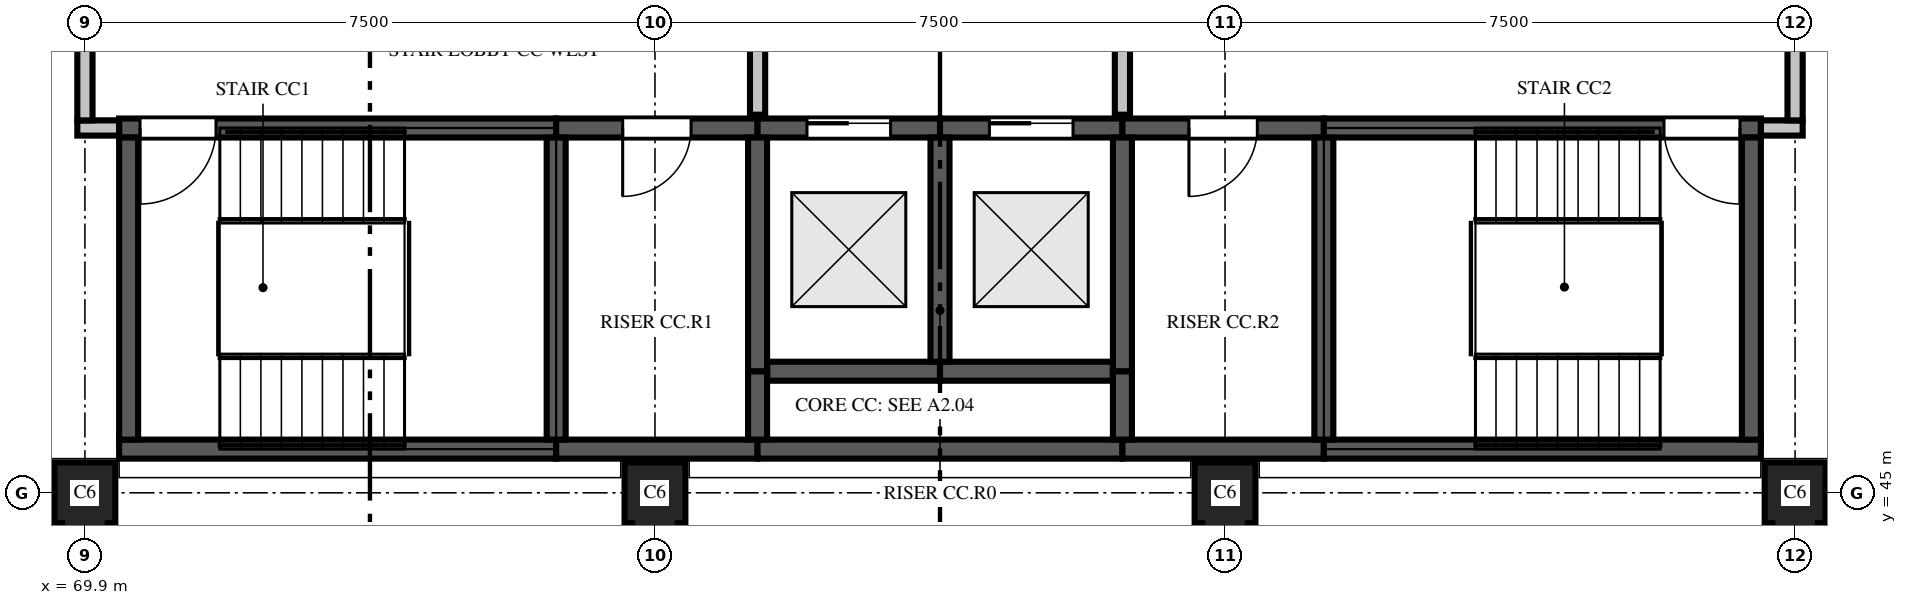
"""IFC4 building model, lengths in metres.
Left out: names, types, materials, properties, quantities, classifications, styles, units other than length and angle.
Written with IfcOpenShell. Run it as: python <this file> out.ifc"""

import sys

from ifc_helpers import new_model, si_unit, direction, frame, frame_2d, origin, place, context, subcontext, project, spatial, polyline, rectangle, outline, extrude, element, fill, save


model = new_model("IFC4")
c1 = context("Model", 3, precision=1e-05, world=origin(), true_north=direction((0.0, 1.0)))
c2 = subcontext(c1, "Body", "Model", "MODEL_VIEW")
j1 = project(units=[si_unit("LENGTHUNIT", "METRE"), si_unit("PLANEANGLEUNIT", "RADIAN")], contexts=[c1])
p1 = place(None, origin())
s1 = spatial("IfcSite", under=j1, at=p1, CompositionType="ELEMENT")
p2 = place(p1, origin())
s2 = spatial("IfcBuilding", under=s1, at=p2, CompositionType="ELEMENT")
p3 = place(p2, frame((0.0, 0.0, 11.9)))
s3 = spatial("IfcBuildingStorey", under=s2, at=p3, CompositionType="ELEMENT", Elevation=11.9)
for number, where, z_axis, x_axis in (
    (1, (69.9, 45.0, 0.0), (0.0, 0.0, 1.0), (0.0, -1.0, 0.0)),
    (2, (77.4, 45.0, 0.0), (0.0, 0.0, 1.0), (0.0, -1.0, 0.0)),
    (3, (84.9, 45.0, 0.0), (0.0, 0.0, 1.0), (0.0, -1.0, 0.0)),
    (4, (92.4, 45.0, 0.0), (0.0, 0.0, 1.0), (0.0, -1.0, 0.0)),
):
    element("IfcColumn", number, at=place(p3, frame(where, z_axis=z_axis, x_axis=x_axis)), inside=s3, PredefinedType="COLUMN", context=c2, shape_type="SweptSolid", body=[
        extrude(outline(polyline([(-0.4, -0.4), (0.4, -0.4), (0.4, -0.3), (0.75, -0.3), (0.75, 0.3), (0.4, 0.3), (0.4, 0.4), (-0.4, 0.4), (-0.4, -0.4)])), origin(), (0.0, 0.0, 1.0), 3.7),
    ])
p4 = place(p3, frame((70.35, 45.575, 0.0), z_axis=(0.0, 0.0, 1.0), x_axis=(1.0, 0.0, 0.0)))
e5 = element("IfcWall", 5, at=p4, inside=s3, PredefinedType="SHEAR", context=c2, shape_type="SweptSolid", body=[
    extrude(rectangle(XDim=5.75, YDim=0.25, at=frame_2d((2.875, 0.0))), origin(), (0.0, 0.0, 1.0), 3.7),
])
p5 = place(p3, frame((76.1, 45.575, 0.0), z_axis=(0.0, 0.0, 1.0), x_axis=(1.0, 0.0, 0.0)))
e6 = element("IfcWall", 6, at=p5, inside=s3, PredefinedType="SHEAR", context=c2, shape_type="SweptSolid", body=[
    extrude(rectangle(XDim=2.65, YDim=0.25, at=frame_2d((1.325, 0.0))), origin(), (0.0, 0.0, 1.0), 3.7),
])
p6 = place(p3, frame((78.75, 45.575, 0.0), z_axis=(0.0, 0.0, 1.0), x_axis=(1.0, 0.0, 0.0)))
e7 = element("IfcWall", 7, at=p6, inside=s3, PredefinedType="SHEAR", context=c2, shape_type="SweptSolid", body=[
    extrude(rectangle(XDim=4.8, YDim=0.25, at=frame_2d((2.4, 0.0))), origin(), (0.0, 0.0, 1.0), 3.7),
])
p7 = place(p3, frame((83.55, 45.575, 0.0), z_axis=(0.0, 0.0, 1.0), x_axis=(1.0, 0.0, 0.0)))
e8 = element("IfcWall", 8, at=p7, inside=s3, PredefinedType="SHEAR", context=c2, shape_type="SweptSolid", body=[
    extrude(rectangle(XDim=2.65, YDim=0.25, at=frame_2d((1.325, 0.0))), origin(), (0.0, 0.0, 1.0), 3.7),
])
p8 = place(p3, frame((86.2, 45.575, 0.0), z_axis=(0.0, 0.0, 1.0), x_axis=(1.0, 0.0, 0.0)))
e9 = element("IfcWall", 9, at=p8, inside=s3, PredefinedType="SHEAR", context=c2, shape_type="SweptSolid", body=[
    extrude(rectangle(XDim=5.75, YDim=0.25, at=frame_2d((2.875, 0.0))), origin(), (0.0, 0.0, 1.0), 3.7),
])
p9 = place(p3, frame((78.875, 46.6, 0.0), z_axis=(0.0, 0.0, 1.0), x_axis=(1.0, 0.0, 0.0)))
e10 = element("IfcWall", 10, at=p9, inside=s3, PredefinedType="SHEAR", context=c2, shape_type="SweptSolid", body=[
    extrude(rectangle(XDim=2.275, YDim=0.25, at=frame_2d((1.137, 0.0))), origin(), (0.0, 0.0, 1.0), 3.7),
])
p10 = place(p3, frame((81.15, 46.6, 0.0), z_axis=(0.0, 0.0, 1.0), x_axis=(1.0, 0.0, 0.0)))
e11 = element("IfcWall", 11, at=p10, inside=s3, PredefinedType="SHEAR", context=c2, shape_type="SweptSolid", body=[
    extrude(rectangle(XDim=2.275, YDim=0.25, at=frame_2d((1.138, 0.0))), origin(), (0.0, 0.0, 1.0), 3.7),
])
p11 = place(p3, frame((70.35, 49.8, 0.0), z_axis=(0.0, 0.0, 1.0), x_axis=(1.0, 0.0, 0.0)))
e12 = element("IfcWall", 12, at=p11, inside=s3, PredefinedType="SHEAR", context=c2, shape_type="SweptSolid", body=[
    extrude(rectangle(XDim=5.75, YDim=0.25, at=frame_2d((2.875, 0.0))), origin(), (0.0, 0.0, 1.0), 3.7),
])
p12 = place(p11, frame((0.275, 0.0, 0.0)))
e13 = element("IfcOpeningElement", 13, at=p12, cuts=e12, PredefinedType="OPENING", context=c2, shape_type="SweptSolid", body=[
    extrude(rectangle(XDim=1.0, YDim=2.1, at=frame_2d((0.5, 1.05))), frame((0.0, 0.135, 0.0), z_axis=(0.0, -1.0, 0.0), x_axis=(1.0, 0.0, 0.0)), (0.0, 0.0, 1.0), 0.27),
])
p13 = place(p3, frame((76.1, 49.8, 0.0), z_axis=(0.0, 0.0, 1.0), x_axis=(1.0, 0.0, 0.0)))
e14 = element("IfcWall", 14, at=p13, inside=s3, PredefinedType="SHEAR", context=c2, shape_type="SweptSolid", body=[
    extrude(rectangle(XDim=2.65, YDim=0.25, at=frame_2d((1.325, 0.0))), origin(), (0.0, 0.0, 1.0), 3.7),
])
p14 = place(p13, frame((0.875, 0.0, 0.0)))
e15 = element("IfcOpeningElement", 15, at=p14, cuts=e14, PredefinedType="OPENING", context=c2, shape_type="SweptSolid", body=[
    extrude(rectangle(XDim=0.9, YDim=2.1, at=frame_2d((0.45, 1.05))), frame((0.0, 0.135, 0.0), z_axis=(0.0, -1.0, 0.0), x_axis=(1.0, 0.0, 0.0)), (0.0, 0.0, 1.0), 0.27),
])
p15 = place(p3, frame((78.75, 49.8, 0.0), z_axis=(0.0, 0.0, 1.0), x_axis=(1.0, 0.0, 0.0)))
e16 = element("IfcWall", 16, at=p15, inside=s3, PredefinedType="SHEAR", context=c2, shape_type="SweptSolid", body=[
    extrude(rectangle(XDim=2.4, YDim=0.25, at=frame_2d((1.2, 0.0))), origin(), (0.0, 0.0, 1.0), 3.7),
])
p16 = place(p15, frame((0.65, 0.0, 0.0)))
e17 = element("IfcOpeningElement", 17, at=p16, cuts=e16, PredefinedType="OPENING", context=c2, shape_type="SweptSolid", body=[
    extrude(rectangle(XDim=1.1, YDim=2.1, at=frame_2d((0.55, 1.05))), frame((0.0, 0.135, 0.0), z_axis=(0.0, -1.0, 0.0), x_axis=(1.0, 0.0, 0.0)), (0.0, 0.0, 1.0), 0.27),
])
p17 = place(p3, frame((81.15, 49.8, 0.0), z_axis=(0.0, 0.0, 1.0), x_axis=(1.0, 0.0, 0.0)))
e18 = element("IfcWall", 18, at=p17, inside=s3, PredefinedType="SHEAR", context=c2, shape_type="SweptSolid", body=[
    extrude(rectangle(XDim=2.4, YDim=0.25, at=frame_2d((1.2, 0.0))), origin(), (0.0, 0.0, 1.0), 3.7),
])
p18 = place(p17, frame((0.65, 0.0, 0.0)))
e19 = element("IfcOpeningElement", 19, at=p18, cuts=e18, PredefinedType="OPENING", context=c2, shape_type="SweptSolid", body=[
    extrude(rectangle(XDim=1.1, YDim=2.1, at=frame_2d((0.55, 1.05))), frame((0.0, 0.135, 0.0), z_axis=(0.0, -1.0, 0.0), x_axis=(1.0, 0.0, 0.0)), (0.0, 0.0, 1.0), 0.27),
])
p19 = place(p3, frame((83.55, 49.8, 0.0), z_axis=(0.0, 0.0, 1.0), x_axis=(1.0, 0.0, 0.0)))
e20 = element("IfcWall", 20, at=p19, inside=s3, PredefinedType="SHEAR", context=c2, shape_type="SweptSolid", body=[
    extrude(rectangle(XDim=2.65, YDim=0.25, at=frame_2d((1.325, 0.0))), origin(), (0.0, 0.0, 1.0), 3.7),
])
p20 = place(p19, frame((0.875, 0.0, 0.0)))
e21 = element("IfcOpeningElement", 21, at=p20, cuts=e20, PredefinedType="OPENING", context=c2, shape_type="SweptSolid", body=[
    extrude(rectangle(XDim=0.9, YDim=2.1, at=frame_2d((0.45, 1.05))), frame((0.0, 0.135, 0.0), z_axis=(0.0, -1.0, 0.0), x_axis=(1.0, 0.0, 0.0)), (0.0, 0.0, 1.0), 0.27),
])
p21 = place(p3, frame((86.2, 49.8, 0.0), z_axis=(0.0, 0.0, 1.0), x_axis=(1.0, 0.0, 0.0)))
e22 = element("IfcWall", 22, at=p21, inside=s3, PredefinedType="SHEAR", context=c2, shape_type="SweptSolid", body=[
    extrude(rectangle(XDim=5.75, YDim=0.25, at=frame_2d((2.875, 0.0))), origin(), (0.0, 0.0, 1.0), 3.7),
])
p22 = place(p21, frame((4.475, 0.0, 0.0)))
e23 = element("IfcOpeningElement", 23, at=p22, cuts=e22, PredefinedType="OPENING", context=c2, shape_type="SweptSolid", body=[
    extrude(rectangle(XDim=1.0, YDim=2.1, at=frame_2d((0.5, 1.05))), frame((0.0, 0.135, 0.0), z_axis=(0.0, -1.0, 0.0), x_axis=(1.0, 0.0, 0.0)), (0.0, 0.0, 1.0), 0.27),
])
for number, where, z_axis, x_axis in (
    (24, (70.475, 45.7, 0.0), (0.0, 0.0, 1.0), (0.0, 1.0, 0.0)),
    (25, (76.1, 45.7, 0.0), (0.0, 0.0, 1.0), (0.0, 1.0, 0.0)),
):
    element("IfcWall", number, at=place(p3, frame(where, z_axis=z_axis, x_axis=x_axis)), inside=s3, PredefinedType="SHEAR", context=c2, shape_type="SweptSolid", body=[
        extrude(rectangle(XDim=3.975, YDim=0.25, at=frame_2d((1.988, 0.0))), origin(), (0.0, 0.0, 1.0), 3.7),
    ])
p23 = place(p3, frame((78.75, 45.7, 0.0), z_axis=(0.0, 0.0, 1.0), x_axis=(0.0, 1.0, 0.0)))
e26 = element("IfcWall", 26, at=p23, inside=s3, PredefinedType="SHEAR", context=c2, shape_type="SweptSolid", body=[
    extrude(rectangle(XDim=0.9, YDim=0.25, at=frame_2d((0.45, 0.0))), origin(), (0.0, 0.0, 1.0), 3.7),
])
p24 = place(p3, frame((78.75, 46.6, 0.0), z_axis=(0.0, 0.0, 1.0), x_axis=(0.0, 1.0, 0.0)))
e27 = element("IfcWall", 27, at=p24, inside=s3, PredefinedType="SHEAR", context=c2, shape_type="SweptSolid", body=[
    extrude(rectangle(XDim=3.075, YDim=0.25, at=frame_2d((1.538, 0.0))), origin(), (0.0, 0.0, 1.0), 3.7),
])
p25 = place(p3, frame((81.15, 46.725, 0.0), z_axis=(0.0, 0.0, 1.0), x_axis=(0.0, 1.0, 0.0)))
e28 = element("IfcWall", 28, at=p25, inside=s3, PredefinedType="SHEAR", context=c2, shape_type="SweptSolid", body=[
    extrude(rectangle(XDim=2.95, YDim=0.25, at=frame_2d((1.475, 0.0))), origin(), (0.0, 0.0, 1.0), 3.7),
])
p26 = place(p3, frame((83.55, 45.7, 0.0), z_axis=(0.0, 0.0, 1.0), x_axis=(0.0, 1.0, 0.0)))
e29 = element("IfcWall", 29, at=p26, inside=s3, PredefinedType="SHEAR", context=c2, shape_type="SweptSolid", body=[
    extrude(rectangle(XDim=0.9, YDim=0.25, at=frame_2d((0.45, 0.0))), origin(), (0.0, 0.0, 1.0), 3.7),
])
p27 = place(p3, frame((83.55, 46.6, 0.0), z_axis=(0.0, 0.0, 1.0), x_axis=(0.0, 1.0, 0.0)))
e30 = element("IfcWall", 30, at=p27, inside=s3, PredefinedType="SHEAR", context=c2, shape_type="SweptSolid", body=[
    extrude(rectangle(XDim=3.075, YDim=0.25, at=frame_2d((1.538, 0.0))), origin(), (0.0, 0.0, 1.0), 3.7),
])
for number, where, z_axis, x_axis in (
    (31, (86.2, 45.7, 0.0), (0.0, 0.0, 1.0), (0.0, 1.0, 0.0)),
    (32, (91.825, 45.7, 0.0), (0.0, 0.0, 1.0), (0.0, 1.0, 0.0)),
):
    element("IfcWall", number, at=place(p3, frame(where, z_axis=z_axis, x_axis=x_axis)), inside=s3, PredefinedType="SHEAR", context=c2, shape_type="SweptSolid", body=[
        extrude(rectangle(XDim=3.975, YDim=0.25, at=frame_2d((1.988, 0.0))), origin(), (0.0, 0.0, 1.0), 3.7),
    ])
for number, where, z_axis, x_axis in (
    (33, (69.8, 49.8, 0.0), (0.0, 0.0, 1.0), (1.0, 0.0, 0.0)),
    (34, (91.95, 49.8, 0.0), (0.0, 0.0, 1.0), (1.0, 0.0, 0.0)),
):
    element("IfcWall", number, at=place(p3, frame(where, z_axis=z_axis, x_axis=x_axis)), inside=s3, PredefinedType="PARTITIONING", context=c2, shape_type="SweptSolid", body=[
        extrude(rectangle(XDim=0.55, YDim=0.2, at=frame_2d((0.275, 0.0))), origin(), (0.0, 0.0, 1.0), 2.88),
    ])
p28 = place(p3, frame((92.4, 49.9, 0.0), z_axis=(0.0, 0.0, 1.0), x_axis=(0.0, 1.0, 0.0)))
e35 = element("IfcWall", 35, at=p28, inside=s3, PredefinedType="PARTITIONING", context=c2, shape_type="SweptSolid", body=[
    extrude(rectangle(XDim=3.0, YDim=0.2, at=frame_2d((1.5, 0.0))), origin(), (0.0, 0.0, 1.0), 2.88),
])
p29 = place(p3, frame((78.75, 49.975, 0.0), z_axis=(0.0, 0.0, 1.0), x_axis=(0.0, 1.0, 0.0)))
e36 = element("IfcWall", 36, at=p29, inside=s3, PredefinedType="PARTITIONING", context=c2, shape_type="SweptSolid", body=[
    extrude(rectangle(XDim=2.925, YDim=0.2, at=frame_2d((1.462, 0.0))), origin(), (0.0, 0.0, 1.0), 2.88),
])
p30 = place(p29, frame((0.962, 0.0, 0.0)))
e37 = element("IfcOpeningElement", 37, at=p30, cuts=e36, PredefinedType="OPENING", context=c2, shape_type="SweptSolid", body=[
    extrude(rectangle(XDim=1.0, YDim=2.1, at=frame_2d((0.5, 1.05))), frame((0.0, 0.11, 0.0), z_axis=(0.0, -1.0, 0.0), x_axis=(1.0, 0.0, 0.0)), (0.0, 0.0, 1.0), 0.22),
])
p31 = place(p3, frame((83.55, 49.975, 0.0), z_axis=(0.0, 0.0, 1.0), x_axis=(0.0, 1.0, 0.0)))
e38 = element("IfcWall", 38, at=p31, inside=s3, PredefinedType="PARTITIONING", context=c2, shape_type="SweptSolid", body=[
    extrude(rectangle(XDim=2.925, YDim=0.2, at=frame_2d((1.462, 0.0))), origin(), (0.0, 0.0, 1.0), 2.88),
])
p32 = place(p3, frame((69.9, 52.9, 0.0), z_axis=(0.0, 0.0, 1.0), x_axis=(0.0, -1.0, 0.0)))
e39 = element("IfcWall", 39, at=p32, inside=s3, PredefinedType="PARTITIONING", context=c2, shape_type="SweptSolid", body=[
    extrude(rectangle(XDim=3.0, YDim=0.2, at=frame_2d((1.5, 0.0))), origin(), (0.0, 0.0, 1.0), 2.88),
])
p33 = place(p16, origin())
e40 = element("IfcDoor", 40, at=p33, inside=s3, OperationType="SLIDING_TO_LEFT", PredefinedType="DOOR", context=c2, shape_type="SweptSolid", body=[
    extrude(rectangle(XDim=1.1, YDim=2.1, at=frame_2d((0.55, 1.05))), frame((0.0, 0.025, 0.0), z_axis=(0.0, -1.0, 0.0), x_axis=(1.0, 0.0, 0.0)), (0.0, 0.0, 1.0), 0.05),
])
fill(e17, e40)
p34 = place(p18, origin())
e41 = element("IfcDoor", 41, at=p34, inside=s3, OperationType="SLIDING_TO_LEFT", PredefinedType="DOOR", context=c2, shape_type="SweptSolid", body=[
    extrude(rectangle(XDim=1.1, YDim=2.1, at=frame_2d((0.55, 1.05))), frame((0.0, 0.025, 0.0), z_axis=(0.0, -1.0, 0.0), x_axis=(1.0, 0.0, 0.0)), (0.0, 0.0, 1.0), 0.05),
])
fill(e19, e41)
p35 = place(p12, origin())
e42 = element("IfcDoor", 42, at=p35, inside=s3, OperationType="SINGLE_SWING_LEFT", PredefinedType="DOOR", context=c2, shape_type="SweptSolid", body=[
    extrude(rectangle(XDim=1.0, YDim=2.1, at=frame_2d((0.5, 1.05))), frame((0.0, 0.025, 0.0), z_axis=(0.0, -1.0, 0.0), x_axis=(1.0, 0.0, 0.0)), (0.0, 0.0, 1.0), 0.05),
])
fill(e13, e42)
p36 = place(p22, origin())
e43 = element("IfcDoor", 43, at=p36, inside=s3, OperationType="SINGLE_SWING_RIGHT", PredefinedType="DOOR", context=c2, shape_type="SweptSolid", body=[
    extrude(rectangle(XDim=1.0, YDim=2.1, at=frame_2d((0.5, 1.05))), frame((0.0, 0.025, 0.0), z_axis=(0.0, -1.0, 0.0), x_axis=(1.0, 0.0, 0.0)), (0.0, 0.0, 1.0), 0.05),
])
fill(e23, e43)
p37 = place(p14, origin())
e44 = element("IfcDoor", 44, at=p37, inside=s3, OperationType="SINGLE_SWING_LEFT", PredefinedType="DOOR", context=c2, shape_type="SweptSolid", body=[
    extrude(rectangle(XDim=0.9, YDim=2.1, at=frame_2d((0.45, 1.05))), frame((0.0, 0.025, 0.0), z_axis=(0.0, -1.0, 0.0), x_axis=(1.0, 0.0, 0.0)), (0.0, 0.0, 1.0), 0.05),
])
fill(e15, e44)
p38 = place(p20, origin())
e45 = element("IfcDoor", 45, at=p38, inside=s3, OperationType="SINGLE_SWING_LEFT", PredefinedType="DOOR", context=c2, shape_type="SweptSolid", body=[
    extrude(rectangle(XDim=0.9, YDim=2.1, at=frame_2d((0.45, 1.05))), frame((0.0, 0.025, 0.0), z_axis=(0.0, -1.0, 0.0), x_axis=(1.0, 0.0, 0.0)), (0.0, 0.0, 1.0), 0.05),
])
fill(e21, e45)
save(model, sys.argv[1])
